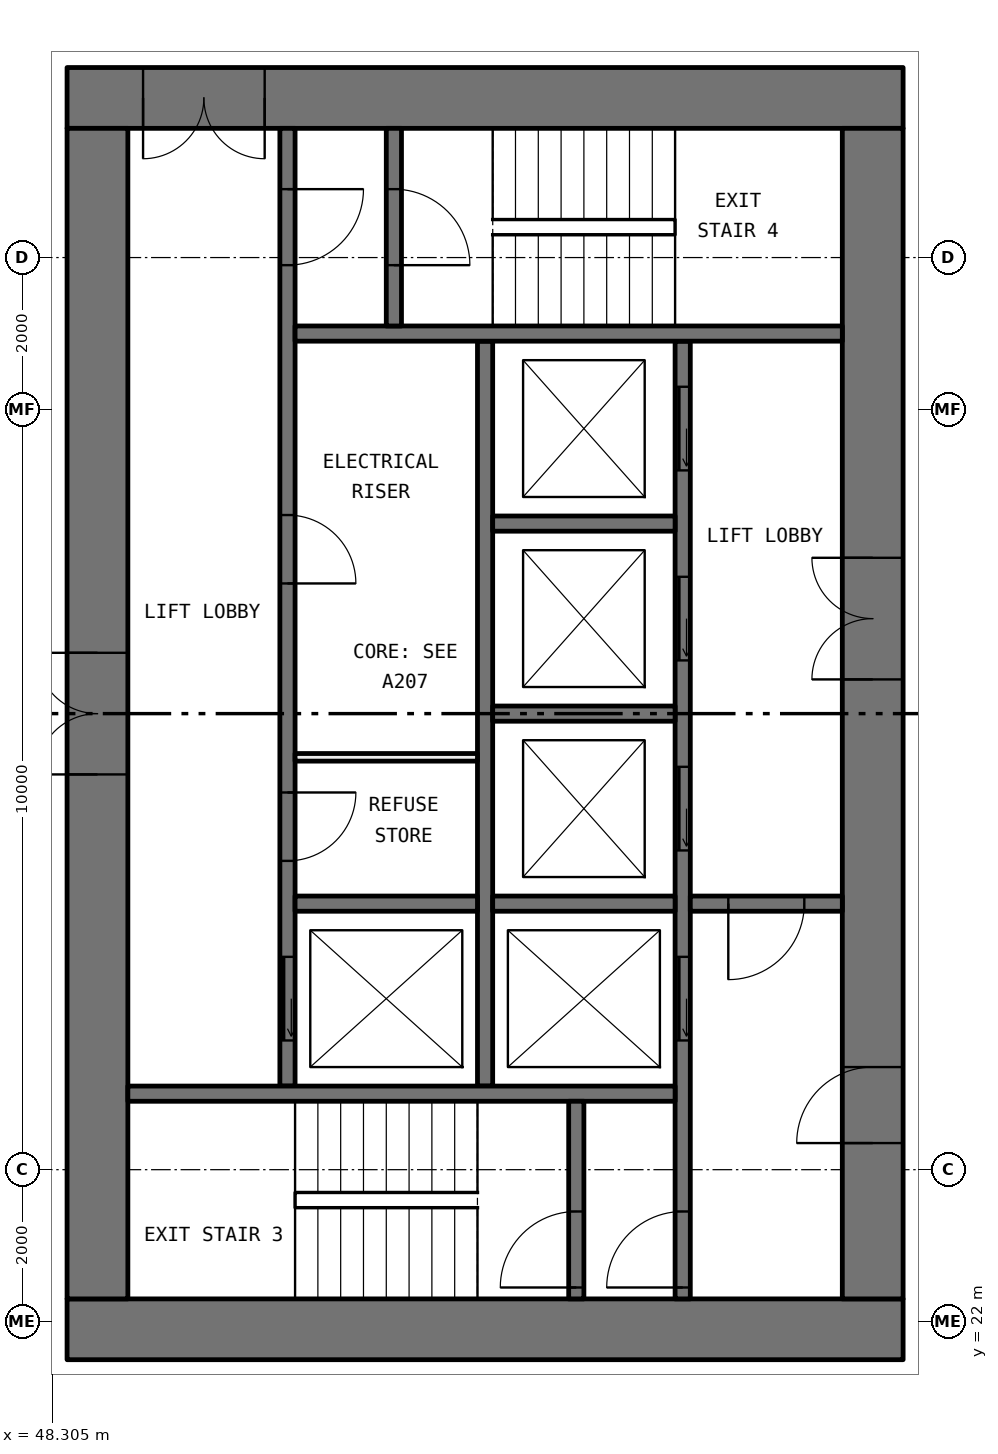
"""IFC4 building model, lengths in metres.
Left out: names, types, materials, properties, quantities, classifications, styles, units other than length and angle.
Written with IfcOpenShell. Run it as: python <this file> out.ifc"""

import sys

from ifc_helpers import new_model, si_unit, direction, frame, frame_2d, origin, place, context, subcontext, project, spatial, rectangle, extrude, element, fill, save


model = new_model("IFC4")
c1 = context("Model", 3, precision=1e-05, world=origin(), true_north=direction((0.0, 1.0)))
c2 = subcontext(c1, "Body", "Model", "MODEL_VIEW")
j1 = project(units=[si_unit("LENGTHUNIT", "METRE"), si_unit("PLANEANGLEUNIT", "RADIAN")], contexts=[c1])
p1 = place(None, origin())
s1 = spatial("IfcSite", under=j1, at=p1, CompositionType="ELEMENT")
p2 = place(p1, origin())
s2 = spatial("IfcBuilding", under=s1, at=p2, CompositionType="ELEMENT")
p3 = place(p2, frame((0.0, 0.0, 33.45)))
s3 = spatial("IfcBuildingStorey", under=s2, at=p3, CompositionType="ELEMENT", Elevation=33.45)
p4 = place(p3, frame((59.5, 21.9, 0.0), z_axis=(0.0, 0.0, 1.0), x_axis=(-1.0, 0.0, 0.0)))
e1 = element("IfcWall", 1, at=p4, inside=s3, PredefinedType="SHEAR", context=c2, shape_type="SweptSolid", body=[
    extrude(rectangle(XDim=11.0, YDim=0.8, at=frame_2d((5.5, 0.0))), origin(), (0.0, 0.0, 1.0), 3.05),
])
p5 = place(p3, frame((59.5, 38.1, 0.0), z_axis=(0.0, 0.0, 1.0), x_axis=(-1.0, 0.0, 0.0)))
e2 = element("IfcWall", 2, at=p5, inside=s3, PredefinedType="SHEAR", context=c2, shape_type="SweptSolid", body=[
    extrude(rectangle(XDim=11.0, YDim=0.8, at=frame_2d((5.5, 0.0))), origin(), (0.0, 0.0, 1.0), 3.05),
])
p6 = place(p5, frame((8.4, 0.0, 0.0)))
e3 = element("IfcOpeningElement", 3, at=p6, cuts=e2, PredefinedType="OPENING", context=c2, shape_type="SweptSolid", body=[
    extrude(rectangle(XDim=1.6, YDim=2.1, at=frame_2d((0.8, 1.05))), frame((0.0, 0.41, 0.0), z_axis=(0.0, -1.0, 0.0), x_axis=(1.0, 0.0, 0.0)), (0.0, 0.0, 1.0), 0.82),
])
p7 = place(p3, frame((59.1, 22.3, 0.0), z_axis=(0.0, 0.0, 1.0), x_axis=(0.0, 1.0, 0.0)))
e4 = element("IfcWall", 4, at=p7, inside=s3, PredefinedType="SHEAR", context=c2, shape_type="SweptSolid", body=[
    extrude(rectangle(XDim=15.4, YDim=0.8, at=frame_2d((7.7, 0.0))), origin(), (0.0, 0.0, 1.0), 3.05),
])
p8 = place(p7, frame((8.15, 0.0, 0.0)))
e5 = element("IfcOpeningElement", 5, at=p8, cuts=e4, PredefinedType="OPENING", context=c2, shape_type="SweptSolid", body=[
    extrude(rectangle(XDim=1.6, YDim=2.1, at=frame_2d((0.8, 1.05))), frame((0.0, 0.41, 0.0), z_axis=(0.0, -1.0, 0.0), x_axis=(1.0, 0.0, 0.0)), (0.0, 0.0, 1.0), 0.82),
])
p9 = place(p7, frame((2.05, 0.0, 0.0)))
e6 = element("IfcOpeningElement", 6, at=p9, cuts=e4, PredefinedType="OPENING", context=c2, shape_type="SweptSolid", body=[
    extrude(rectangle(XDim=1.0, YDim=2.1, at=frame_2d((0.5, 1.05))), frame((0.0, 0.41, 0.0), z_axis=(0.0, -1.0, 0.0), x_axis=(1.0, 0.0, 0.0)), (0.0, 0.0, 1.0), 0.82),
])
p10 = place(p3, frame((48.9, 22.3, 0.0), z_axis=(0.0, 0.0, 1.0), x_axis=(0.0, 1.0, 0.0)))
e7 = element("IfcWall", 7, at=p10, inside=s3, PredefinedType="SHEAR", context=c2, shape_type="SweptSolid", body=[
    extrude(rectangle(XDim=15.4, YDim=0.8, at=frame_2d((7.7, 0.0))), origin(), (0.0, 0.0, 1.0), 3.05),
])
p11 = place(p10, frame((6.9, 0.0, 0.0)))
e8 = element("IfcOpeningElement", 8, at=p11, cuts=e7, PredefinedType="OPENING", context=c2, shape_type="SweptSolid", body=[
    extrude(rectangle(XDim=1.6, YDim=2.1, at=frame_2d((0.8, 1.05))), frame((0.0, 0.41, 0.0), z_axis=(0.0, -1.0, 0.0), x_axis=(1.0, 0.0, 0.0)), (0.0, 0.0, 1.0), 0.82),
])
p12 = place(p3, frame((56.6, 22.3, 0.0), z_axis=(0.0, 0.0, 1.0), x_axis=(0.0, 1.0, 0.0)))
e9 = element("IfcWall", 9, at=p12, inside=s3, PredefinedType="SOLIDWALL", context=c2, shape_type="SweptSolid", body=[
    extrude(rectangle(XDim=12.6, YDim=0.2, at=frame_2d((6.3, 0.0))), origin(), (0.0, 0.0, 1.0), 3.05),
])
p13 = place(p12, frame((3.4, 0.0, 0.0)))
e10 = element("IfcOpeningElement", 10, at=p13, cuts=e9, PredefinedType="OPENING", context=c2, shape_type="SweptSolid", body=[
    extrude(rectangle(XDim=1.1, YDim=2.1, at=frame_2d((0.55, 1.05))), frame((0.0, 0.11, 0.0), z_axis=(0.0, -1.0, 0.0), x_axis=(1.0, 0.0, 0.0)), (0.0, 0.0, 1.0), 0.22),
])
p14 = place(p12, frame((5.9, 0.0, 0.0)))
e11 = element("IfcOpeningElement", 11, at=p14, cuts=e9, PredefinedType="OPENING", context=c2, shape_type="SweptSolid", body=[
    extrude(rectangle(XDim=1.1, YDim=2.1, at=frame_2d((0.55, 1.05))), frame((0.0, 0.11, 0.0), z_axis=(0.0, -1.0, 0.0), x_axis=(1.0, 0.0, 0.0)), (0.0, 0.0, 1.0), 0.22),
])
p15 = place(p12, frame((8.4, 0.0, 0.0)))
e12 = element("IfcOpeningElement", 12, at=p15, cuts=e9, PredefinedType="OPENING", context=c2, shape_type="SweptSolid", body=[
    extrude(rectangle(XDim=1.1, YDim=2.1, at=frame_2d((0.55, 1.05))), frame((0.0, 0.11, 0.0), z_axis=(0.0, -1.0, 0.0), x_axis=(1.0, 0.0, 0.0)), (0.0, 0.0, 1.0), 0.22),
])
p16 = place(p12, frame((10.9, 0.0, 0.0)))
e13 = element("IfcOpeningElement", 13, at=p16, cuts=e9, PredefinedType="OPENING", context=c2, shape_type="SweptSolid", body=[
    extrude(rectangle(XDim=1.1, YDim=2.1, at=frame_2d((0.55, 1.05))), frame((0.0, 0.11, 0.0), z_axis=(0.0, -1.0, 0.0), x_axis=(1.0, 0.0, 0.0)), (0.0, 0.0, 1.0), 0.22),
])
p17 = place(p12, frame((0.15, 0.0, 0.0)))
e14 = element("IfcOpeningElement", 14, at=p17, cuts=e9, PredefinedType="OPENING", context=c2, shape_type="SweptSolid", body=[
    extrude(rectangle(XDim=1.0, YDim=2.1, at=frame_2d((0.5, 1.05))), frame((0.0, 0.11, 0.0), z_axis=(0.0, -1.0, 0.0), x_axis=(1.0, 0.0, 0.0)), (0.0, 0.0, 1.0), 0.22),
])
p18 = place(p3, frame((51.4, 25.1, 0.0), z_axis=(0.0, 0.0, 1.0), x_axis=(0.0, 1.0, 0.0)))
e15 = element("IfcWall", 15, at=p18, inside=s3, PredefinedType="SOLIDWALL", context=c2, shape_type="SweptSolid", body=[
    extrude(rectangle(XDim=12.6, YDim=0.2, at=frame_2d((6.3, 0.0))), origin(), (0.0, 0.0, 1.0), 3.05),
])
p19 = place(p18, frame((0.6, 0.0, 0.0)))
e16 = element("IfcOpeningElement", 16, at=p19, cuts=e15, PredefinedType="OPENING", context=c2, shape_type="SweptSolid", body=[
    extrude(rectangle(XDim=1.1, YDim=2.1, at=frame_2d((0.55, 1.05))), frame((0.0, 0.11, 0.0), z_axis=(0.0, -1.0, 0.0), x_axis=(1.0, 0.0, 0.0)), (0.0, 0.0, 1.0), 0.22),
])
p20 = place(p18, frame((10.8, 0.0, 0.0)))
e17 = element("IfcOpeningElement", 17, at=p20, cuts=e15, PredefinedType="OPENING", context=c2, shape_type="SweptSolid", body=[
    extrude(rectangle(XDim=1.0, YDim=2.1, at=frame_2d((0.5, 1.05))), frame((0.0, 0.11, 0.0), z_axis=(0.0, -1.0, 0.0), x_axis=(1.0, 0.0, 0.0)), (0.0, 0.0, 1.0), 0.22),
])
p21 = place(p18, frame((2.962, 0.0, 0.0)))
e18 = element("IfcOpeningElement", 18, at=p21, cuts=e15, PredefinedType="OPENING", context=c2, shape_type="SweptSolid", body=[
    extrude(rectangle(XDim=0.9, YDim=2.1, at=frame_2d((0.45, 1.05))), frame((0.0, 0.11, 0.0), z_axis=(0.0, -1.0, 0.0), x_axis=(1.0, 0.0, 0.0)), (0.0, 0.0, 1.0), 0.22),
])
p22 = place(p18, frame((6.613, 0.0, 0.0)))
e19 = element("IfcOpeningElement", 19, at=p22, cuts=e15, PredefinedType="OPENING", context=c2, shape_type="SweptSolid", body=[
    extrude(rectangle(XDim=0.9, YDim=2.1, at=frame_2d((0.45, 1.05))), frame((0.0, 0.11, 0.0), z_axis=(0.0, -1.0, 0.0), x_axis=(1.0, 0.0, 0.0)), (0.0, 0.0, 1.0), 0.22),
])
p23 = place(p3, frame((54.0, 25.1, 0.0), z_axis=(0.0, 0.0, 1.0), x_axis=(0.0, 1.0, 0.0)))
e20 = element("IfcWall", 20, at=p23, inside=s3, PredefinedType="SOLIDWALL", context=c2, shape_type="SweptSolid", body=[
    extrude(rectangle(XDim=9.8, YDim=0.2, at=frame_2d((4.9, 0.0))), origin(), (0.0, 0.0, 1.0), 3.05),
])
for number, where, z_axis, x_axis in (
    (21, (56.5, 25.0, 0.0), (0.0, 0.0, 1.0), (-1.0, 0.0, 0.0)),
    (22, (58.7, 35.0, 0.0), (0.0, 0.0, 1.0), (-1.0, 0.0, 0.0)),
):
    element("IfcWall", number, at=place(p3, frame(where, z_axis=z_axis, x_axis=x_axis)), inside=s3, PredefinedType="SOLIDWALL", context=c2, shape_type="SweptSolid", body=[
        extrude(rectangle(XDim=7.2, YDim=0.2, at=frame_2d((3.6, 0.0))), origin(), (0.0, 0.0, 1.0), 3.05),
    ])
p24 = place(p3, frame((58.7, 27.5, 0.0), z_axis=(0.0, 0.0, 1.0), x_axis=(-1.0, 0.0, 0.0)))
e23 = element("IfcWall", 23, at=p24, inside=s3, PredefinedType="SOLIDWALL", context=c2, shape_type="SweptSolid", body=[
    extrude(rectangle(XDim=2.0, YDim=0.2, at=frame_2d((1.0, 0.0))), origin(), (0.0, 0.0, 1.0), 3.05),
])
p25 = place(p24, frame((0.5, 0.0, 0.0)))
e24 = element("IfcOpeningElement", 24, at=p25, cuts=e23, PredefinedType="OPENING", context=c2, shape_type="SweptSolid", body=[
    extrude(rectangle(XDim=1.0, YDim=2.1, at=frame_2d((0.5, 1.05))), frame((0.0, 0.11, 0.0), z_axis=(0.0, -1.0, 0.0), x_axis=(1.0, 0.0, 0.0)), (0.0, 0.0, 1.0), 0.22),
])
p26 = place(p3, frame((55.2, 22.3, 0.0), z_axis=(0.0, 0.0, 1.0), x_axis=(0.0, 1.0, 0.0)))
e25 = element("IfcWall", 25, at=p26, inside=s3, PredefinedType="SOLIDWALL", context=c2, shape_type="SweptSolid", body=[
    extrude(rectangle(XDim=2.6, YDim=0.2, at=frame_2d((1.3, 0.0))), origin(), (0.0, 0.0, 1.0), 3.05),
])
p27 = place(p26, frame((0.15, 0.0, 0.0)))
e26 = element("IfcOpeningElement", 26, at=p27, cuts=e25, PredefinedType="OPENING", context=c2, shape_type="SweptSolid", body=[
    extrude(rectangle(XDim=1.0, YDim=2.1, at=frame_2d((0.5, 1.05))), frame((0.0, 0.11, 0.0), z_axis=(0.0, -1.0, 0.0), x_axis=(1.0, 0.0, 0.0)), (0.0, 0.0, 1.0), 0.22),
])
p28 = place(p3, frame((52.8, 35.1, 0.0), z_axis=(0.0, 0.0, 1.0), x_axis=(0.0, 1.0, 0.0)))
e27 = element("IfcWall", 27, at=p28, inside=s3, PredefinedType="SOLIDWALL", context=c2, shape_type="SweptSolid", body=[
    extrude(rectangle(XDim=2.6, YDim=0.2, at=frame_2d((1.3, 0.0))), origin(), (0.0, 0.0, 1.0), 3.05),
])
p29 = place(p28, frame((0.8, 0.0, 0.0)))
e28 = element("IfcOpeningElement", 28, at=p29, cuts=e27, PredefinedType="OPENING", context=c2, shape_type="SweptSolid", body=[
    extrude(rectangle(XDim=1.0, YDim=2.1, at=frame_2d((0.5, 1.05))), frame((0.0, 0.11, 0.0), z_axis=(0.0, -1.0, 0.0), x_axis=(1.0, 0.0, 0.0)), (0.0, 0.0, 1.0), 0.22),
])
for number, where, z_axis, x_axis in (
    (29, (56.5, 27.5, 0.0), (0.0, 0.0, 1.0), (-1.0, 0.0, 0.0)),
    (30, (56.5, 30.0, 0.0), (0.0, 0.0, 1.0), (-1.0, 0.0, 0.0)),
    (31, (56.5, 32.5, 0.0), (0.0, 0.0, 1.0), (-1.0, 0.0, 0.0)),
    (32, (53.9, 27.5, 0.0), (0.0, 0.0, 1.0), (-1.0, 0.0, 0.0)),
):
    element("IfcWall", number, at=place(p3, frame(where, z_axis=z_axis, x_axis=x_axis)), inside=s3, PredefinedType="SOLIDWALL", context=c2, shape_type="SweptSolid", body=[
        extrude(rectangle(XDim=2.4, YDim=0.2, at=frame_2d((1.2, 0.0))), origin(), (0.0, 0.0, 1.0), 3.05),
    ])
p30 = place(p3, frame((53.9, 29.425, 0.0), z_axis=(0.0, 0.0, 1.0), x_axis=(-1.0, 0.0, 0.0)))
e33 = element("IfcWall", 33, at=p30, inside=s3, PredefinedType="PARTITIONING", context=c2, shape_type="SweptSolid", body=[
    extrude(rectangle(XDim=2.4, YDim=0.1, at=frame_2d((1.2, 0.0))), origin(), (0.0, 0.0, 1.0), 3.05),
])
p31 = place(p19, origin())
e34 = element("IfcDoor", 34, at=p31, inside=s3, OperationType="SLIDING_TO_LEFT", PredefinedType="DOOR", context=c2, shape_type="SweptSolid", body=[
    extrude(rectangle(XDim=1.1, YDim=2.1, at=frame_2d((0.55, 1.05))), frame((0.0, 0.025, 0.0), z_axis=(0.0, -1.0, 0.0), x_axis=(1.0, 0.0, 0.0)), (0.0, 0.0, 1.0), 0.05),
])
fill(e16, e34)
p32 = place(p13, origin())
e35 = element("IfcDoor", 35, at=p32, inside=s3, OperationType="SLIDING_TO_LEFT", PredefinedType="DOOR", context=c2, shape_type="SweptSolid", body=[
    extrude(rectangle(XDim=1.1, YDim=2.1, at=frame_2d((0.55, 1.05))), frame((0.0, 0.025, 0.0), z_axis=(0.0, -1.0, 0.0), x_axis=(1.0, 0.0, 0.0)), (0.0, 0.0, 1.0), 0.05),
])
fill(e10, e35)
p33 = place(p14, origin())
e36 = element("IfcDoor", 36, at=p33, inside=s3, OperationType="SLIDING_TO_LEFT", PredefinedType="DOOR", context=c2, shape_type="SweptSolid", body=[
    extrude(rectangle(XDim=1.1, YDim=2.1, at=frame_2d((0.55, 1.05))), frame((0.0, 0.025, 0.0), z_axis=(0.0, -1.0, 0.0), x_axis=(1.0, 0.0, 0.0)), (0.0, 0.0, 1.0), 0.05),
])
fill(e11, e36)
p34 = place(p15, origin())
e37 = element("IfcDoor", 37, at=p34, inside=s3, OperationType="SLIDING_TO_LEFT", PredefinedType="DOOR", context=c2, shape_type="SweptSolid", body=[
    extrude(rectangle(XDim=1.1, YDim=2.1, at=frame_2d((0.55, 1.05))), frame((0.0, 0.025, 0.0), z_axis=(0.0, -1.0, 0.0), x_axis=(1.0, 0.0, 0.0)), (0.0, 0.0, 1.0), 0.05),
])
fill(e12, e37)
p35 = place(p16, origin())
e38 = element("IfcDoor", 38, at=p35, inside=s3, OperationType="SLIDING_TO_LEFT", PredefinedType="DOOR", context=c2, shape_type="SweptSolid", body=[
    extrude(rectangle(XDim=1.1, YDim=2.1, at=frame_2d((0.55, 1.05))), frame((0.0, 0.025, 0.0), z_axis=(0.0, -1.0, 0.0), x_axis=(1.0, 0.0, 0.0)), (0.0, 0.0, 1.0), 0.05),
])
fill(e13, e38)
p36 = place(p27, origin())
e39 = element("IfcDoor", 39, at=p36, inside=s3, OperationType="SINGLE_SWING_RIGHT", PredefinedType="DOOR", context=c2, shape_type="SweptSolid", body=[
    extrude(rectangle(XDim=1.0, YDim=2.1, at=frame_2d((0.5, 1.05))), frame((0.0, 0.025, 0.0), z_axis=(0.0, -1.0, 0.0), x_axis=(1.0, 0.0, 0.0)), (0.0, 0.0, 1.0), 0.05),
])
fill(e26, e39)
p37 = place(p17, origin())
e40 = element("IfcDoor", 40, at=p37, inside=s3, OperationType="SINGLE_SWING_RIGHT", PredefinedType="DOOR", context=c2, shape_type="SweptSolid", body=[
    extrude(rectangle(XDim=1.0, YDim=2.1, at=frame_2d((0.5, 1.05))), frame((0.0, 0.025, 0.0), z_axis=(0.0, -1.0, 0.0), x_axis=(1.0, 0.0, 0.0)), (0.0, 0.0, 1.0), 0.05),
])
fill(e14, e40)
p38 = place(p20, frame((1.0, 0.0, 0.0), x_axis=(-1.0, 0.0, 0.0)))
e41 = element("IfcDoor", 41, at=p38, inside=s3, OperationType="SINGLE_SWING_RIGHT", PredefinedType="DOOR", context=c2, shape_type="SweptSolid", body=[
    extrude(rectangle(XDim=1.0, YDim=2.1, at=frame_2d((0.5, 1.05))), frame((0.0, 0.025, 0.0), z_axis=(0.0, -1.0, 0.0), x_axis=(1.0, 0.0, 0.0)), (0.0, 0.0, 1.0), 0.05),
])
fill(e17, e41)
p39 = place(p29, frame((1.0, 0.0, 0.0), x_axis=(-1.0, 0.0, 0.0)))
e42 = element("IfcDoor", 42, at=p39, inside=s3, OperationType="SINGLE_SWING_LEFT", PredefinedType="DOOR", context=c2, shape_type="SweptSolid", body=[
    extrude(rectangle(XDim=1.0, YDim=2.1, at=frame_2d((0.5, 1.05))), frame((0.0, 0.025, 0.0), z_axis=(0.0, -1.0, 0.0), x_axis=(1.0, 0.0, 0.0)), (0.0, 0.0, 1.0), 0.05),
])
fill(e28, e42)
p40 = place(p25, origin())
e43 = element("IfcDoor", 43, at=p40, inside=s3, OperationType="SINGLE_SWING_LEFT", PredefinedType="DOOR", context=c2, shape_type="SweptSolid", body=[
    extrude(rectangle(XDim=1.0, YDim=2.1, at=frame_2d((0.5, 1.05))), frame((0.0, 0.025, 0.0), z_axis=(0.0, -1.0, 0.0), x_axis=(1.0, 0.0, 0.0)), (0.0, 0.0, 1.0), 0.05),
])
fill(e24, e43)
p41 = place(p8, origin())
e44 = element("IfcDoor", 44, at=p41, inside=s3, OperationType="DOUBLE_DOOR_SINGLE_SWING", PredefinedType="DOOR", context=c2, shape_type="SweptSolid", body=[
    extrude(rectangle(XDim=1.6, YDim=2.1, at=frame_2d((0.8, 1.05))), frame((0.0, 0.025, 0.0), z_axis=(0.0, -1.0, 0.0), x_axis=(1.0, 0.0, 0.0)), (0.0, 0.0, 1.0), 0.05),
])
fill(e5, e44)
p42 = place(p9, origin())
e45 = element("IfcDoor", 45, at=p42, inside=s3, OperationType="SINGLE_SWING_RIGHT", PredefinedType="DOOR", context=c2, shape_type="SweptSolid", body=[
    extrude(rectangle(XDim=1.0, YDim=2.1, at=frame_2d((0.5, 1.05))), frame((0.0, 0.025, 0.0), z_axis=(0.0, -1.0, 0.0), x_axis=(1.0, 0.0, 0.0)), (0.0, 0.0, 1.0), 0.05),
])
fill(e6, e45)
p43 = place(p6, origin())
e46 = element("IfcDoor", 46, at=p43, inside=s3, OperationType="DOUBLE_DOOR_SINGLE_SWING", PredefinedType="DOOR", context=c2, shape_type="SweptSolid", body=[
    extrude(rectangle(XDim=1.6, YDim=2.1, at=frame_2d((0.8, 1.05))), frame((0.0, 0.025, 0.0), z_axis=(0.0, -1.0, 0.0), x_axis=(1.0, 0.0, 0.0)), (0.0, 0.0, 1.0), 0.05),
])
fill(e3, e46)
p44 = place(p11, origin())
e47 = element("IfcDoor", 47, at=p44, inside=s3, OperationType="DOUBLE_DOOR_SINGLE_SWING", PredefinedType="DOOR", context=c2, shape_type="SweptSolid", body=[
    extrude(rectangle(XDim=1.6, YDim=2.1, at=frame_2d((0.8, 1.05))), frame((0.0, 0.025, 0.0), z_axis=(0.0, -1.0, 0.0), x_axis=(1.0, 0.0, 0.0)), (0.0, 0.0, 1.0), 0.05),
])
fill(e8, e47)
p45 = place(p21, frame((0.9, 0.0, 0.0), x_axis=(-1.0, 0.0, 0.0)))
e48 = element("IfcDoor", 48, at=p45, inside=s3, OperationType="SINGLE_SWING_RIGHT", PredefinedType="DOOR", context=c2, shape_type="SweptSolid", body=[
    extrude(rectangle(XDim=0.9, YDim=2.1, at=frame_2d((0.45, 1.05))), frame((0.0, 0.025, 0.0), z_axis=(0.0, -1.0, 0.0), x_axis=(1.0, 0.0, 0.0)), (0.0, 0.0, 1.0), 0.05),
])
fill(e18, e48)
p46 = place(p22, frame((0.9, 0.0, 0.0), x_axis=(-1.0, 0.0, 0.0)))
e49 = element("IfcDoor", 49, at=p46, inside=s3, OperationType="SINGLE_SWING_LEFT", PredefinedType="DOOR", context=c2, shape_type="SweptSolid", body=[
    extrude(rectangle(XDim=0.9, YDim=2.1, at=frame_2d((0.45, 1.05))), frame((0.0, 0.025, 0.0), z_axis=(0.0, -1.0, 0.0), x_axis=(1.0, 0.0, 0.0)), (0.0, 0.0, 1.0), 0.05),
])
fill(e19, e49)
save(model, sys.argv[1])
